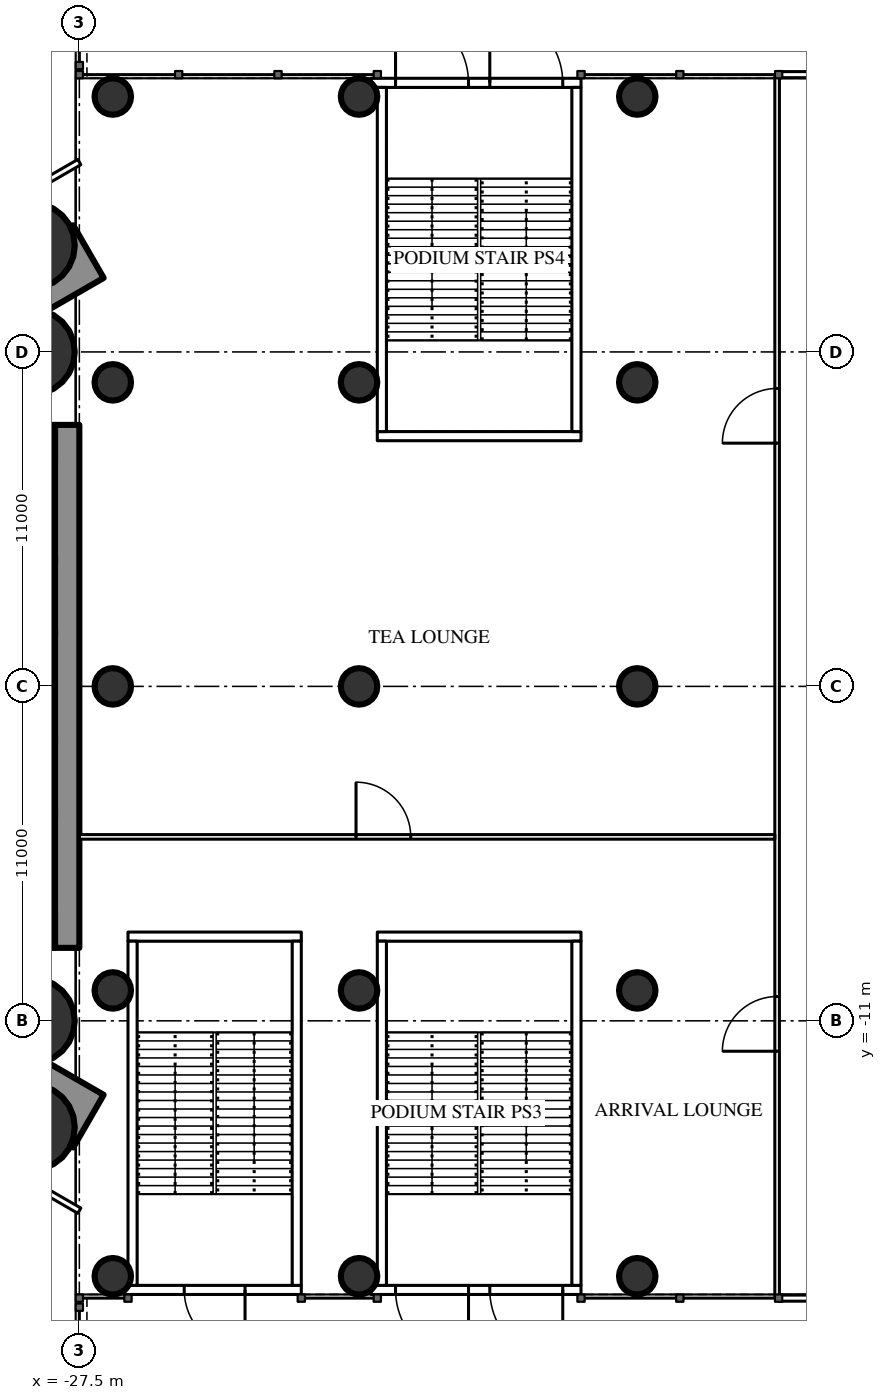
"""IFC4 building model, lengths in metres.
Left out: names, types, materials, properties, quantities, classifications, styles, units other than length and angle.
Written with IfcOpenShell. Run it as: python <this file> out.ifc"""

import sys

from ifc_helpers import new_model, si_unit, direction, frame, frame_2d, origin, origin_2d, place, context, subcontext, project, spatial, rectangle, circle, hollow_circle, extrude, element, fill, save


model = new_model("IFC4")
c1 = context("Model", 3, precision=1e-05, world=origin(), true_north=direction((0.0, 1.0)))
c2 = subcontext(c1, "Body", "Model", "MODEL_VIEW")
j1 = project(units=[si_unit("LENGTHUNIT", "METRE"), si_unit("PLANEANGLEUNIT", "RADIAN")], contexts=[c1])
p1 = place(None, origin())
s1 = spatial("IfcSite", under=j1, at=p1, CompositionType="ELEMENT")
p2 = place(p1, origin())
s2 = spatial("IfcBuilding", under=s1, at=p2, CompositionType="ELEMENT")
p3 = place(p2, origin())
s3 = spatial("IfcBuildingStorey", under=s2, at=p3, CompositionType="ELEMENT", Elevation=0.0)
for number, where, z_axis, x_axis in (
    (1, (-29.05, -11.0, 0.0), (0.0, 0.0, 1.0), (1.0, 0.0, 0.0)),
    (2, (-29.05, 11.0, 0.0), (0.0, 0.0, 1.0), (1.0, 0.0, 0.0)),
    (3, (-29.05, 14.5, 0.0), (0.0, 0.0, 1.0), (1.0, 0.0, 0.0)),
    (4, (-29.05, -14.5, 0.0), (0.0, 0.0, 1.0), (1.0, 0.0, 0.0)),
):
    element("IfcColumn", number, at=place(p3, frame(where, z_axis=z_axis, x_axis=x_axis)), inside=s3, PredefinedType="COLUMN", context=c2, shape_type="SweptSolid", body=[
        extrude(hollow_circle(Radius=1.4, WallThickness=0.12, at=origin_2d()), origin(), (0.0, 0.0, 1.0), 7.2),
    ])
p4 = place(p3, frame((-27.9, 8.6, 0.0), z_axis=(0.0, 0.0, 1.0), x_axis=(0.0, -1.0, 0.0)))
e5 = element("IfcWall", 5, at=p4, inside=s3, PredefinedType="SHEAR", context=c2, shape_type="SweptSolid", body=[
    extrude(rectangle(XDim=17.2, YDim=0.8, at=frame_2d((8.6, 0.0))), origin(), (0.0, 0.0, 1.0), 7.2),
])
p5 = place(p3, frame((-28.3, 8.0, 0.0), z_axis=(0.0, 0.0, 1.0), x_axis=(-1.0, 0.0, 0.0)))
e6 = element("IfcWall", 6, at=p5, inside=s3, PredefinedType="SHEAR", context=c2, shape_type="SweptSolid", body=[
    extrude(rectangle(XDim=8.4, YDim=1.2, at=frame_2d((4.2, 0.0))), origin(), (0.0, 0.0, 1.0), 7.2),
])
p6 = place(p5, frame((0.25, 0.0, 0.0)))
e7 = element("IfcOpeningElement", 7, at=p6, cuts=e6, PredefinedType="OPENING", context=c2, shape_type="SweptSolid", body=[
    extrude(rectangle(XDim=1.0, YDim=2.2, at=frame_2d((0.5, 1.1))), frame((0.0, 0.61, 0.0), z_axis=(0.0, -1.0, 0.0), x_axis=(1.0, 0.0, 0.0)), (0.0, 0.0, 1.0), 1.22),
])
p7 = place(p3, frame((-28.3, -8.0, 0.0), z_axis=(0.0, 0.0, 1.0), x_axis=(-1.0, 0.0, 0.0)))
e8 = element("IfcWall", 8, at=p7, inside=s3, PredefinedType="SHEAR", context=c2, shape_type="SweptSolid", body=[
    extrude(rectangle(XDim=8.4, YDim=1.2, at=frame_2d((4.2, 0.0))), origin(), (0.0, 0.0, 1.0), 7.2),
])
p8 = place(p7, frame((0.25, 0.0, 0.0)))
e9 = element("IfcOpeningElement", 9, at=p8, cuts=e8, PredefinedType="OPENING", context=c2, shape_type="SweptSolid", body=[
    extrude(rectangle(XDim=1.0, YDim=2.2, at=frame_2d((0.5, 1.1))), frame((0.0, 0.61, 0.0), z_axis=(0.0, -1.0, 0.0), x_axis=(1.0, 0.0, 0.0)), (0.0, 0.0, 1.0), 1.22),
])
for number, where, z_axis, x_axis in (
    (10, (-28.3, 4.15, 0.0), (0.0, 0.0, 1.0), (-1.0, 0.0, 0.0)),
    (11, (-28.3, -4.15, 0.0), (0.0, 0.0, 1.0), (-1.0, 0.0, 0.0)),
):
    element("IfcWall", number, at=place(p3, frame(where, z_axis=z_axis, x_axis=x_axis)), inside=s3, PredefinedType="SHEAR", context=c2, shape_type="SweptSolid", body=[
        extrude(rectangle(XDim=8.4, YDim=0.3, at=frame_2d((4.2, 0.0))), origin(), (0.0, 0.0, 1.0), 7.2),
    ])
for number, where, z_axis, x_axis in (
    (12, (-28.3, 1.775, 0.0), (0.0, 0.0, 1.0), (-1.0, 0.0, 0.0)),
    (13, (-28.3, -1.775, 0.0), (0.0, 0.0, 1.0), (-1.0, 0.0, 0.0)),
):
    element("IfcWall", number, at=place(p3, frame(where, z_axis=z_axis, x_axis=x_axis)), inside=s3, PredefinedType="SHEAR", context=c2, shape_type="SweptSolid", body=[
        extrude(rectangle(XDim=2.9, YDim=0.25, at=frame_2d((1.45, 0.0))), origin(), (0.0, 0.0, 1.0), 7.2),
    ])
p9 = place(p3, frame((-27.2, 14.3, 0.0), z_axis=(0.0, 0.0, 1.0), x_axis=(-0.866026593062, -0.499997940104, 0.0)))
e14 = element("IfcWall", 14, at=p9, inside=s3, PredefinedType="SHEAR", context=c2, shape_type="SweptSolid", body=[
    extrude(rectangle(XDim=28.946, YDim=2.0, at=frame_2d((14.473, 0.0))), origin(), (0.0, 0.0, 1.0), 7.2),
])
p10 = place(p9, frame((4.6, 0.0, 0.0)))
e15 = element("IfcOpeningElement", 15, at=p10, cuts=e14, PredefinedType="OPENING", context=c2, shape_type="SweptSolid", body=[
    extrude(rectangle(XDim=1.0, YDim=2.2, at=frame_2d((0.5, 1.1))), frame((0.0, 1.01, 0.0), z_axis=(0.0, -1.0, 0.0), x_axis=(1.0, 0.0, 0.0)), (0.0, 0.0, 1.0), 2.02),
])
p11 = place(p9, frame((13.395, 0.0, 0.0)))
e16 = element("IfcOpeningElement", 16, at=p11, cuts=e14, PredefinedType="OPENING", context=c2, shape_type="SweptSolid", body=[
    extrude(rectangle(XDim=1.8, YDim=2.2, at=frame_2d((0.9, 1.1))), frame((0.0, 1.01, 0.0), z_axis=(0.0, -1.0, 0.0), x_axis=(1.0, 0.0, 0.0)), (0.0, 0.0, 1.0), 2.02),
])
p12 = place(p3, frame((-27.2, -14.3, 0.0), z_axis=(0.0, 0.0, 1.0), x_axis=(-0.866024044937, 0.500002353585, 0.0)))
e17 = element("IfcWall", 17, at=p12, inside=s3, PredefinedType="SHEAR", context=c2, shape_type="SweptSolid", body=[
    extrude(rectangle(XDim=27.533, YDim=2.0, at=frame_2d((13.767, 0.0))), origin(), (0.0, 0.0, 1.0), 7.2),
])
p13 = place(p12, frame((4.6, 0.0, 0.0)))
e18 = element("IfcOpeningElement", 18, at=p13, cuts=e17, PredefinedType="OPENING", context=c2, shape_type="SweptSolid", body=[
    extrude(rectangle(XDim=1.0, YDim=2.2, at=frame_2d((0.5, 1.1))), frame((0.0, 1.01, 0.0), z_axis=(0.0, -1.0, 0.0), x_axis=(1.0, 0.0, 0.0)), (0.0, 0.0, 1.0), 2.02),
])
p14 = place(p12, frame((13.395, 0.0, 0.0)))
e19 = element("IfcOpeningElement", 19, at=p14, cuts=e17, PredefinedType="OPENING", context=c2, shape_type="SweptSolid", body=[
    extrude(rectangle(XDim=1.8, YDim=2.2, at=frame_2d((0.9, 1.1))), frame((0.0, 1.01, 0.0), z_axis=(0.0, -1.0, 0.0), x_axis=(1.0, 0.0, 0.0)), (0.0, 0.0, 1.0), 2.02),
])
for number, where, z_axis, x_axis in (
    (20, (-26.4, -19.4, 0.0), (0.0, 0.0, 1.0), (1.0, 0.0, 0.0)),
    (21, (-26.4, -10.0, 0.0), (0.0, 0.0, 1.0), (1.0, 0.0, 0.0)),
    (22, (-26.4, 0.0, 0.0), (0.0, 0.0, 1.0), (1.0, 0.0, 0.0)),
    (23, (-26.4, 10.0, 0.0), (0.0, 0.0, 1.0), (1.0, 0.0, 0.0)),
    (24, (-26.4, 19.4, 0.0), (0.0, 0.0, 1.0), (1.0, 0.0, 0.0)),
    (25, (-18.3, -19.4, 0.0), (0.0, 0.0, 1.0), (1.0, 0.0, 0.0)),
    (26, (-18.3, -10.0, 0.0), (0.0, 0.0, 1.0), (1.0, 0.0, 0.0)),
    (27, (-18.3, 0.0, 0.0), (0.0, 0.0, 1.0), (1.0, 0.0, 0.0)),
    (28, (-18.3, 10.0, 0.0), (0.0, 0.0, 1.0), (1.0, 0.0, 0.0)),
    (29, (-18.3, 19.4, 0.0), (0.0, 0.0, 1.0), (1.0, 0.0, 0.0)),
    (30, (-9.15, -19.4, 0.0), (0.0, 0.0, 1.0), (1.0, 0.0, 0.0)),
    (31, (-9.15, -10.0, 0.0), (0.0, 0.0, 1.0), (1.0, 0.0, 0.0)),
    (32, (-9.15, 0.0, 0.0), (0.0, 0.0, 1.0), (1.0, 0.0, 0.0)),
    (33, (-9.15, 10.0, 0.0), (0.0, 0.0, 1.0), (1.0, 0.0, 0.0)),
    (34, (-9.15, 19.4, 0.0), (0.0, 0.0, 1.0), (1.0, 0.0, 0.0)),
):
    element("IfcColumn", number, at=place(p3, frame(where, z_axis=z_axis, x_axis=x_axis)), inside=s3, PredefinedType="COLUMN", context=c2, shape_type="SweptSolid", body=[
        extrude(circle(Radius=0.6, at=origin_2d()), origin(), (0.0, 0.0, 1.0), 7.2),
    ])
p15 = place(p3, frame((4.5, -20.12, 0.0), z_axis=(0.0, 0.0, 1.0), x_axis=(-1.0, 0.0, 0.0)))
e35 = element("IfcWall", 35, at=p15, inside=s3, PredefinedType="STANDARD", context=c2, shape_type="SweptSolid", body=[
    extrude(rectangle(XDim=9.0, YDim=0.2, at=frame_2d((4.5, 0.0))), origin(), (0.0, 0.0, 1.0), 6.85),
])
p16 = place(p15, frame((6.0, 0.0, 0.0)))
e36 = element("IfcOpeningElement", 36, at=p16, cuts=e35, PredefinedType="OPENING", context=c2, shape_type="SweptSolid", body=[
    extrude(rectangle(XDim=1.8, YDim=2.4, at=frame_2d((0.9, 1.2))), frame((0.0, 0.11, 0.0), z_axis=(0.0, -1.0, 0.0), x_axis=(1.0, 0.0, 0.0)), (0.0, 0.0, 1.0), 0.22),
])
p17 = place(p15, frame((1.2, 0.0, 0.0)))
e37 = element("IfcOpeningElement", 37, at=p17, cuts=e35, PredefinedType="OPENING", context=c2, shape_type="SweptSolid", body=[
    extrude(rectangle(XDim=1.8, YDim=2.4, at=frame_2d((0.9, 1.2))), frame((0.0, 0.11, 0.0), z_axis=(0.0, -1.0, 0.0), x_axis=(1.0, 0.0, 0.0)), (0.0, 0.0, 1.0), 0.22),
])
p18 = place(p3, frame((-4.5, 20.12, 0.0), z_axis=(0.0, 0.0, 1.0), x_axis=(1.0, 0.0, 0.0)))
e38 = element("IfcWall", 38, at=p18, inside=s3, PredefinedType="STANDARD", context=c2, shape_type="SweptSolid", body=[
    extrude(rectangle(XDim=9.0, YDim=0.2, at=frame_2d((4.5, 0.0))), origin(), (0.0, 0.0, 1.0), 6.85),
])
p19 = place(p18, frame((6.0, 0.0, 0.0)))
e39 = element("IfcOpeningElement", 39, at=p19, cuts=e38, PredefinedType="OPENING", context=c2, shape_type="SweptSolid", body=[
    extrude(rectangle(XDim=1.8, YDim=2.4, at=frame_2d((0.9, 1.2))), frame((0.0, 0.11, 0.0), z_axis=(0.0, -1.0, 0.0), x_axis=(1.0, 0.0, 0.0)), (0.0, 0.0, 1.0), 0.22),
])
p20 = place(p18, frame((1.2, 0.0, 0.0)))
e40 = element("IfcOpeningElement", 40, at=p20, cuts=e38, PredefinedType="OPENING", context=c2, shape_type="SweptSolid", body=[
    extrude(rectangle(XDim=1.8, YDim=2.4, at=frame_2d((0.9, 1.2))), frame((0.0, 0.11, 0.0), z_axis=(0.0, -1.0, 0.0), x_axis=(1.0, 0.0, 0.0)), (0.0, 0.0, 1.0), 0.22),
])
p21 = place(p3, frame((-27.5, 17.244, 0.0), z_axis=(0.0, 0.0, 1.0), x_axis=(-0.866039316896, -0.499975901009, 0.0)))
e41 = element("IfcWall", 41, at=p21, inside=s3, PredefinedType="PARTITIONING", context=c2, shape_type="SweptSolid", body=[
    extrude(rectangle(XDim=3.169, YDim=0.2, at=frame_2d((1.584, 0.0))), origin(), (0.0, 0.0, 1.0), 6.85),
])
p22 = place(p3, frame((-27.5, -17.244, 0.0), z_axis=(0.0, 0.0, 1.0), x_axis=(-0.866027347857, 0.499996632752, 0.0)))
e42 = element("IfcWall", 42, at=p22, inside=s3, PredefinedType="PARTITIONING", context=c2, shape_type="SweptSolid", body=[
    extrude(rectangle(XDim=6.269, YDim=0.2, at=frame_2d((3.135, 0.0))), origin(), (0.0, 0.0, 1.0), 6.85),
])
p23 = place(p3, frame((-4.55, -20.06, 0.0), z_axis=(0.0, 0.0, 1.0), x_axis=(0.0, 1.0, 0.0)))
e43 = element("IfcWall", 43, at=p23, inside=s3, PredefinedType="PARTITIONING", context=c2, shape_type="SweptSolid", body=[
    extrude(rectangle(XDim=40.12, YDim=0.15, at=frame_2d((20.06, 0.0))), origin(), (0.0, 0.0, 1.0), 5.85),
])
p24 = place(p23, frame((8.06, 0.0, 0.0)))
e44 = element("IfcOpeningElement", 44, at=p24, cuts=e43, PredefinedType="OPENING", context=c2, shape_type="SweptSolid", body=[
    extrude(rectangle(XDim=1.8, YDim=2.2, at=frame_2d((0.9, 1.1))), frame((0.0, 0.085, 0.0), z_axis=(0.0, -1.0, 0.0), x_axis=(1.0, 0.0, 0.0)), (0.0, 0.0, 1.0), 0.17),
])
p25 = place(p23, frame((28.06, 0.0, 0.0)))
e45 = element("IfcOpeningElement", 45, at=p25, cuts=e43, PredefinedType="OPENING", context=c2, shape_type="SweptSolid", body=[
    extrude(rectangle(XDim=1.8, YDim=2.2, at=frame_2d((0.9, 1.1))), frame((0.0, 0.085, 0.0), z_axis=(0.0, -1.0, 0.0), x_axis=(1.0, 0.0, 0.0)), (0.0, 0.0, 1.0), 0.17),
])
p26 = place(p3, frame((-27.5, -4.95, 0.0), z_axis=(0.0, 0.0, 1.0), x_axis=(1.0, 0.0, 0.0)))
e46 = element("IfcWall", 46, at=p26, inside=s3, PredefinedType="PARTITIONING", context=c2, shape_type="SweptSolid", body=[
    extrude(rectangle(XDim=22.875, YDim=0.15, at=frame_2d((11.438, 0.0))), origin(), (0.0, 0.0, 1.0), 5.85),
])
p27 = place(p26, frame((9.1, 0.0, 0.0)))
e47 = element("IfcOpeningElement", 47, at=p27, cuts=e46, PredefinedType="OPENING", context=c2, shape_type="SweptSolid", body=[
    extrude(rectangle(XDim=1.8, YDim=2.2, at=frame_2d((0.9, 1.1))), frame((0.0, 0.085, 0.0), z_axis=(0.0, -1.0, 0.0), x_axis=(1.0, 0.0, 0.0)), (0.0, 0.0, 1.0), 0.17),
])
p28 = place(p3, frame((-11.0, -19.85, 0.0), z_axis=(0.0, 0.0, 1.0), x_axis=(-1.0, 0.0, 0.0)))
e48 = element("IfcWall", 48, at=p28, inside=s3, PredefinedType="SOLIDWALL", context=c2, shape_type="SweptSolid", body=[
    extrude(rectangle(XDim=6.903, YDim=0.3, at=frame_2d((3.452, 0.0))), origin(), (0.0, 0.0, 1.0), 5.95),
])
p29 = place(p28, frame((3.7, 0.0, 0.0)))
e49 = element("IfcOpeningElement", 49, at=p29, cuts=e48, PredefinedType="OPENING", context=c2, shape_type="SweptSolid", body=[
    extrude(rectangle(XDim=2.4, YDim=2.2, at=frame_2d((1.2, 1.1))), frame((0.0, 0.16, 0.0), z_axis=(0.0, -1.0, 0.0), x_axis=(1.0, 0.0, 0.0)), (0.0, 0.0, 1.0), 0.32),
])
p30 = place(p28, frame((0.6, 0.0, 0.0)))
e50 = element("IfcOpeningElement", 50, at=p30, cuts=e48, PredefinedType="OPENING", context=c2, shape_type="SweptSolid", body=[
    extrude(rectangle(XDim=2.4, YDim=2.2, at=frame_2d((1.2, 1.1))), frame((0.0, 0.16, 0.0), z_axis=(0.0, -1.0, 0.0), x_axis=(1.0, 0.0, 0.0)), (0.0, 0.0, 1.0), 0.32),
])
p31 = place(p3, frame((-17.7, -8.23, 0.0), z_axis=(0.0, 0.0, 1.0), x_axis=(1.0, 0.0, 0.0)))
e51 = element("IfcWall", 51, at=p31, inside=s3, PredefinedType="SOLIDWALL", context=c2, shape_type="SweptSolid", body=[
    extrude(rectangle(XDim=6.7, YDim=0.3, at=frame_2d((3.35, 0.0))), origin(), (0.0, 0.0, 1.0), 6.85),
])
for number, where, z_axis, x_axis in (
    (52, (-11.15, -8.38, 0.0), (0.0, 0.0, 1.0), (0.0, -1.0, 0.0)),
    (53, (-17.55, -8.38, 0.0), (0.0, 0.0, 1.0), (0.0, -1.0, 0.0)),
):
    element("IfcWall", number, at=place(p3, frame(where, z_axis=z_axis, x_axis=x_axis)), inside=s3, PredefinedType="SOLIDWALL", context=c2, shape_type="SweptSolid", body=[
        extrude(rectangle(XDim=11.32, YDim=0.3, at=frame_2d((5.66, 0.0))), origin(), (0.0, 0.0, 1.0), 6.85),
    ])
p32 = place(p3, frame((-17.903, 19.85, 0.0), z_axis=(0.0, 0.0, 1.0), x_axis=(1.0, 0.0, 0.0)))
e54 = element("IfcWall", 54, at=p32, inside=s3, PredefinedType="SOLIDWALL", context=c2, shape_type="SweptSolid", body=[
    extrude(rectangle(XDim=6.903, YDim=0.3, at=frame_2d((3.452, 0.0))), origin(), (0.0, 0.0, 1.0), 5.95),
])
p33 = place(p32, frame((0.803, 0.0, 0.0)))
e55 = element("IfcOpeningElement", 55, at=p33, cuts=e54, PredefinedType="OPENING", context=c2, shape_type="SweptSolid", body=[
    extrude(rectangle(XDim=2.4, YDim=2.2, at=frame_2d((1.2, 1.1))), frame((0.0, 0.16, 0.0), z_axis=(0.0, -1.0, 0.0), x_axis=(1.0, 0.0, 0.0)), (0.0, 0.0, 1.0), 0.32),
])
p34 = place(p32, frame((3.903, 0.0, 0.0)))
e56 = element("IfcOpeningElement", 56, at=p34, cuts=e54, PredefinedType="OPENING", context=c2, shape_type="SweptSolid", body=[
    extrude(rectangle(XDim=2.4, YDim=2.2, at=frame_2d((1.2, 1.1))), frame((0.0, 0.16, 0.0), z_axis=(0.0, -1.0, 0.0), x_axis=(1.0, 0.0, 0.0)), (0.0, 0.0, 1.0), 0.32),
])
p35 = place(p3, frame((-17.7, 8.23, 0.0), z_axis=(0.0, 0.0, 1.0), x_axis=(1.0, 0.0, 0.0)))
e57 = element("IfcWall", 57, at=p35, inside=s3, PredefinedType="SOLIDWALL", context=c2, shape_type="SweptSolid", body=[
    extrude(rectangle(XDim=6.7, YDim=0.3, at=frame_2d((3.35, 0.0))), origin(), (0.0, 0.0, 1.0), 6.85),
])
for number, where, z_axis, x_axis in (
    (58, (-11.15, 8.38, 0.0), (0.0, 0.0, 1.0), (0.0, 1.0, 0.0)),
    (59, (-17.55, 8.38, 0.0), (0.0, 0.0, 1.0), (0.0, 1.0, 0.0)),
):
    element("IfcWall", number, at=place(p3, frame(where, z_axis=z_axis, x_axis=x_axis)), inside=s3, PredefinedType="SOLIDWALL", context=c2, shape_type="SweptSolid", body=[
        extrude(rectangle(XDim=11.32, YDim=0.3, at=frame_2d((5.66, 0.0))), origin(), (0.0, 0.0, 1.0), 6.85),
    ])
p36 = place(p3, frame((-20.2, -19.85, 0.0), z_axis=(0.0, 0.0, 1.0), x_axis=(-1.0, 0.0, 0.0)))
e60 = element("IfcWall", 60, at=p36, inside=s3, PredefinedType="SOLIDWALL", context=c2, shape_type="SweptSolid", body=[
    extrude(rectangle(XDim=5.803, YDim=0.3, at=frame_2d((2.902, 0.0))), origin(), (0.0, 0.0, 1.0), 5.95),
])
p37 = place(p36, frame((1.85, 0.0, 0.0)))
e61 = element("IfcOpeningElement", 61, at=p37, cuts=e60, PredefinedType="OPENING", context=c2, shape_type="SweptSolid", body=[
    extrude(rectangle(XDim=2.0, YDim=2.2, at=frame_2d((1.0, 1.1))), frame((0.0, 0.16, 0.0), z_axis=(0.0, -1.0, 0.0), x_axis=(1.0, 0.0, 0.0)), (0.0, 0.0, 1.0), 0.32),
])
p38 = place(p3, frame((-25.9, -8.23, 0.0), z_axis=(0.0, 0.0, 1.0), x_axis=(1.0, 0.0, 0.0)))
e62 = element("IfcWall", 62, at=p38, inside=s3, PredefinedType="SOLIDWALL", context=c2, shape_type="SweptSolid", body=[
    extrude(rectangle(XDim=5.7, YDim=0.3, at=frame_2d((2.85, 0.0))), origin(), (0.0, 0.0, 1.0), 6.85),
])
for number, where, z_axis, x_axis in (
    (63, (-20.35, -8.38, 0.0), (0.0, 0.0, 1.0), (0.0, -1.0, 0.0)),
    (64, (-25.75, -8.38, 0.0), (0.0, 0.0, 1.0), (0.0, -1.0, 0.0)),
):
    element("IfcWall", number, at=place(p3, frame(where, z_axis=z_axis, x_axis=x_axis)), inside=s3, PredefinedType="SOLIDWALL", context=c2, shape_type="SweptSolid", body=[
        extrude(rectangle(XDim=11.32, YDim=0.3, at=frame_2d((5.66, 0.0))), origin(), (0.0, 0.0, 1.0), 6.85),
    ])
p39 = place(p24, origin())
e65 = element("IfcDoor", 65, at=p39, inside=s3, OperationType="DOUBLE_DOOR_SINGLE_SWING", PredefinedType="DOOR", context=c2, shape_type="SweptSolid", body=[
    extrude(rectangle(XDim=1.8, YDim=2.2, at=frame_2d((0.9, 1.1))), frame((0.0, 0.025, 0.0), z_axis=(0.0, -1.0, 0.0), x_axis=(1.0, 0.0, 0.0)), (0.0, 0.0, 1.0), 0.05),
])
fill(e44, e65)
p40 = place(p25, origin())
e66 = element("IfcDoor", 66, at=p40, inside=s3, OperationType="DOUBLE_DOOR_SINGLE_SWING", PredefinedType="DOOR", context=c2, shape_type="SweptSolid", body=[
    extrude(rectangle(XDim=1.8, YDim=2.2, at=frame_2d((0.9, 1.1))), frame((0.0, 0.025, 0.0), z_axis=(0.0, -1.0, 0.0), x_axis=(1.0, 0.0, 0.0)), (0.0, 0.0, 1.0), 0.05),
])
fill(e45, e66)
p41 = place(p27, origin())
e67 = element("IfcDoor", 67, at=p41, inside=s3, OperationType="DOUBLE_DOOR_SINGLE_SWING", PredefinedType="DOOR", context=c2, shape_type="SweptSolid", body=[
    extrude(rectangle(XDim=1.8, YDim=2.2, at=frame_2d((0.9, 1.1))), frame((0.0, 0.025, 0.0), z_axis=(0.0, -1.0, 0.0), x_axis=(1.0, 0.0, 0.0)), (0.0, 0.0, 1.0), 0.05),
])
fill(e47, e67)
p42 = place(p29, origin())
e68 = element("IfcDoor", 68, at=p42, inside=s3, OperationType="DOUBLE_DOOR_SINGLE_SWING", PredefinedType="DOOR", context=c2, shape_type="SweptSolid", body=[
    extrude(rectangle(XDim=2.4, YDim=2.2, at=frame_2d((1.2, 1.1))), frame((0.0, 0.025, 0.0), z_axis=(0.0, -1.0, 0.0), x_axis=(1.0, 0.0, 0.0)), (0.0, 0.0, 1.0), 0.05),
])
fill(e49, e68)
p43 = place(p30, origin())
e69 = element("IfcDoor", 69, at=p43, inside=s3, OperationType="DOUBLE_DOOR_SINGLE_SWING", PredefinedType="DOOR", context=c2, shape_type="SweptSolid", body=[
    extrude(rectangle(XDim=2.4, YDim=2.2, at=frame_2d((1.2, 1.1))), frame((0.0, 0.025, 0.0), z_axis=(0.0, -1.0, 0.0), x_axis=(1.0, 0.0, 0.0)), (0.0, 0.0, 1.0), 0.05),
])
fill(e50, e69)
p44 = place(p33, origin())
e70 = element("IfcDoor", 70, at=p44, inside=s3, OperationType="DOUBLE_DOOR_SINGLE_SWING", PredefinedType="DOOR", context=c2, shape_type="SweptSolid", body=[
    extrude(rectangle(XDim=2.4, YDim=2.2, at=frame_2d((1.2, 1.1))), frame((0.0, 0.025, 0.0), z_axis=(0.0, -1.0, 0.0), x_axis=(1.0, 0.0, 0.0)), (0.0, 0.0, 1.0), 0.05),
])
fill(e55, e70)
p45 = place(p34, origin())
e71 = element("IfcDoor", 71, at=p45, inside=s3, OperationType="DOUBLE_DOOR_SINGLE_SWING", PredefinedType="DOOR", context=c2, shape_type="SweptSolid", body=[
    extrude(rectangle(XDim=2.4, YDim=2.2, at=frame_2d((1.2, 1.1))), frame((0.0, 0.025, 0.0), z_axis=(0.0, -1.0, 0.0), x_axis=(1.0, 0.0, 0.0)), (0.0, 0.0, 1.0), 0.05),
])
fill(e56, e71)
p46 = place(p37, origin())
e72 = element("IfcDoor", 72, at=p46, inside=s3, OperationType="DOUBLE_DOOR_SINGLE_SWING", PredefinedType="DOOR", context=c2, shape_type="SweptSolid", body=[
    extrude(rectangle(XDim=2.0, YDim=2.2, at=frame_2d((1.0, 1.1))), frame((0.0, 0.025, 0.0), z_axis=(0.0, -1.0, 0.0), x_axis=(1.0, 0.0, 0.0)), (0.0, 0.0, 1.0), 0.05),
])
fill(e61, e72)
save(model, sys.argv[1])
